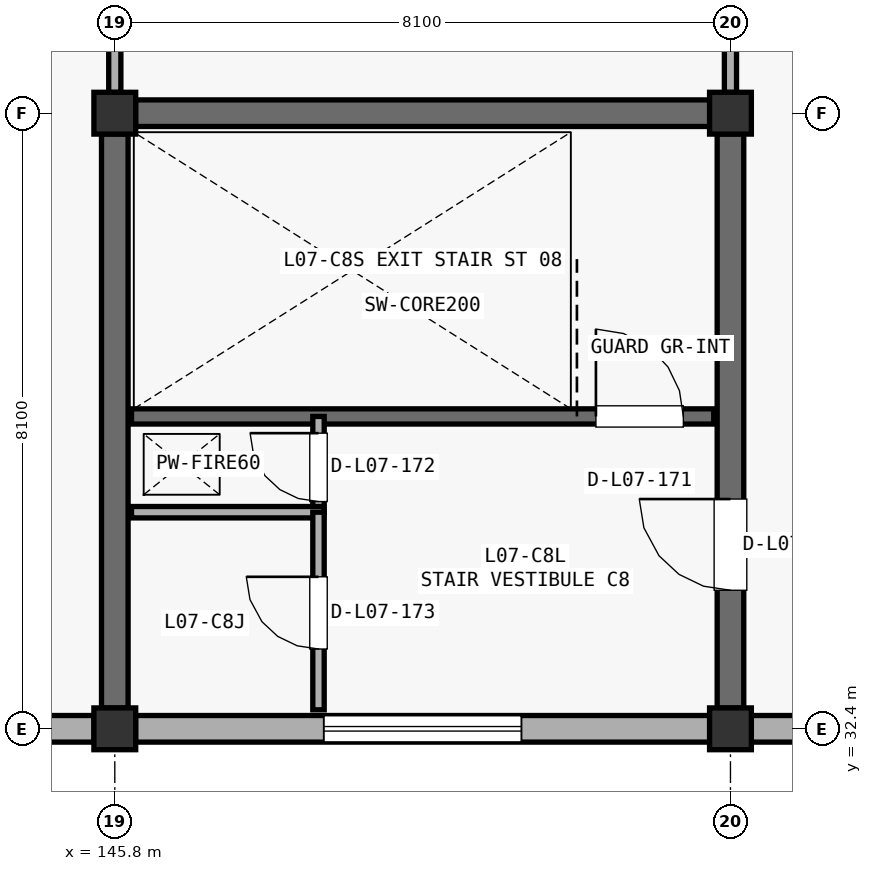
"""IFC4 building model, lengths in metres.
Left out: names, types, materials, properties, quantities, classifications, styles, units other than length and angle.
Written with IfcOpenShell. Run it as: python <this file> out.ifc"""

import sys

from ifc_helpers import new_model, si_unit, direction, frame, frame_2d, origin, origin_2d, place, context, subcontext, project, spatial, rectangle, extrude, element, fill, save


model = new_model("IFC4")
c1 = context("Model", 3, precision=1e-05, world=origin(), true_north=direction((0.0, 1.0)))
c2 = subcontext(c1, "Body", "Model", "MODEL_VIEW")
j1 = project(units=[si_unit("LENGTHUNIT", "METRE"), si_unit("PLANEANGLEUNIT", "RADIAN")], contexts=[c1])
p1 = place(None, origin())
s1 = spatial("IfcSite", under=j1, at=p1, CompositionType="ELEMENT")
p2 = place(p1, origin())
s2 = spatial("IfcBuilding", under=s1, at=p2, CompositionType="ELEMENT")
p3 = place(p2, frame((0.0, 0.0, 31.79)))
s3 = spatial("IfcBuildingStorey", under=s2, at=p3, CompositionType="ELEMENT", Elevation=31.79)
for number, where, z_axis, x_axis in (
    (1, (145.8, 32.4, 0.0), (0.0, 0.0, 1.0), (1.0, 0.0, 0.0)),
    (2, (145.8, 40.5, 0.0), (0.0, 0.0, 1.0), (1.0, 0.0, 0.0)),
    (3, (153.9, 32.4, 0.0), (0.0, 0.0, 1.0), (1.0, 0.0, 0.0)),
    (4, (153.9, 40.5, 0.0), (0.0, 0.0, 1.0), (1.0, 0.0, 0.0)),
):
    element("IfcColumn", number, at=place(p3, frame(where, z_axis=z_axis, x_axis=x_axis)), inside=s3, PredefinedType="COLUMN", context=c2, shape_type="SweptSolid", body=[
        extrude(rectangle(XDim=0.55, YDim=0.55, at=origin_2d()), origin(), (0.0, 0.0, 1.0), 4.42),
    ])
p4 = place(p3, frame((137.973, 32.4, 0.0), z_axis=(0.0, 0.0, 1.0), x_axis=(1.0, 0.0, 0.0)))
e5 = element("IfcWall", 5, at=p4, inside=s3, PredefinedType="STANDARD", context=c2, shape_type="SweptSolid", body=[
    extrude(rectangle(XDim=7.554, YDim=0.35, at=frame_2d((3.777, 0.0))), origin(), (0.0, 0.0, 1.0), 3.512),
])
p5 = place(p4, frame((2.977, 0.0, 0.85)))
e6 = element("IfcOpeningElement", 6, at=p5, cuts=e5, PredefinedType="OPENING", context=c2, shape_type="SweptSolid", body=[
    extrude(rectangle(XDim=1.6, YDim=1.85, at=frame_2d((0.8, 0.925))), frame((0.0, 0.185, 0.0), z_axis=(0.0, -1.0, 0.0), x_axis=(1.0, 0.0, 0.0)), (0.0, 0.0, 1.0), 0.37),
])
p6 = place(p3, frame((146.073, 32.4, 0.0), z_axis=(0.0, 0.0, 1.0), x_axis=(1.0, 0.0, 0.0)))
e7 = element("IfcWall", 7, at=p6, inside=s3, PredefinedType="STANDARD", context=c2, shape_type="SweptSolid", body=[
    extrude(rectangle(XDim=7.554, YDim=0.35, at=frame_2d((3.777, 0.0))), origin(), (0.0, 0.0, 1.0), 3.412),
])
p7 = place(p6, frame((2.477, 0.0, 0.85)))
e8 = element("IfcOpeningElement", 8, at=p7, cuts=e7, PredefinedType="OPENING", context=c2, shape_type="SweptSolid", body=[
    extrude(rectangle(XDim=2.6, YDim=1.95, at=frame_2d((1.3, 0.975))), frame((0.0, 0.185, 0.0), z_axis=(0.0, -1.0, 0.0), x_axis=(1.0, 0.0, 0.0)), (0.0, 0.0, 1.0), 0.37),
])
p8 = place(p3, frame((154.173, 32.4, 0.0), z_axis=(0.0, 0.0, 1.0), x_axis=(1.0, 0.0, 0.0)))
e9 = element("IfcWall", 9, at=p8, inside=s3, PredefinedType="STANDARD", context=c2, shape_type="SweptSolid", body=[
    extrude(rectangle(XDim=7.554, YDim=0.35, at=frame_2d((3.777, 0.0))), origin(), (0.0, 0.0, 1.0), 3.512),
])
p9 = place(p8, frame((2.677, 0.0, 0.85)))
e10 = element("IfcOpeningElement", 10, at=p9, cuts=e9, PredefinedType="OPENING", context=c2, shape_type="SweptSolid", body=[
    extrude(rectangle(XDim=2.2, YDim=1.95, at=frame_2d((1.1, 0.975))), frame((0.0, 0.185, 0.0), z_axis=(0.0, -1.0, 0.0), x_axis=(1.0, 0.0, 0.0)), (0.0, 0.0, 1.0), 0.37),
])
for number, where, z_axis, x_axis in (
    (11, (146.073, 40.5, 0.0), (0.0, 0.0, 1.0), (1.0, 0.0, 0.0)),
    (12, (145.8, 32.673, 0.0), (0.0, 0.0, 1.0), (0.0, 1.0, 0.0)),
):
    element("IfcWall", number, at=place(p3, frame(where, z_axis=z_axis, x_axis=x_axis)), inside=s3, PredefinedType="SHEAR", context=c2, shape_type="SweptSolid", body=[
        extrude(rectangle(XDim=7.554, YDim=0.35, at=frame_2d((3.777, 0.0))), origin(), (0.0, 0.0, 1.0), 4.162),
    ])
p10 = place(p3, frame((153.9, 32.673, 0.0), z_axis=(0.0, 0.0, 1.0), x_axis=(0.0, 1.0, 0.0)))
e13 = element("IfcWall", 13, at=p10, inside=s3, PredefinedType="SHEAR", context=c2, shape_type="SweptSolid", body=[
    extrude(rectangle(XDim=7.554, YDim=0.35, at=frame_2d((3.777, 0.0))), origin(), (0.0, 0.0, 1.0), 4.162),
])
p11 = place(p10, frame((1.55, 0.0, 0.0)))
e14 = element("IfcOpeningElement", 14, at=p11, cuts=e13, PredefinedType="OPENING", context=c2, shape_type="SweptSolid", body=[
    extrude(rectangle(XDim=1.2, YDim=2.2, at=frame_2d((0.6, 1.1))), frame((0.0, 0.185, 0.0), z_axis=(0.0, -1.0, 0.0), x_axis=(1.0, 0.0, 0.0)), (0.0, 0.0, 1.0), 0.37),
])
p12 = place(p3, frame((146.02, 36.51, 0.0), z_axis=(0.0, 0.0, 1.0), x_axis=(1.0, 0.0, 0.0)))
e15 = element("IfcWall", 15, at=p12, inside=s3, PredefinedType="SHEAR", context=c2, shape_type="SweptSolid", body=[
    extrude(rectangle(XDim=7.66, YDim=0.2, at=frame_2d((3.83, 0.0))), origin(), (0.0, 0.0, 1.0), 4.162),
])
p13 = place(p12, frame((6.11, 0.0, 0.0)))
e16 = element("IfcOpeningElement", 16, at=p13, cuts=e15, PredefinedType="OPENING", context=c2, shape_type="SweptSolid", body=[
    extrude(rectangle(XDim=1.15, YDim=2.2, at=frame_2d((0.575, 1.1))), frame((0.0, 0.11, 0.0), z_axis=(0.0, -1.0, 0.0), x_axis=(1.0, 0.0, 0.0)), (0.0, 0.0, 1.0), 0.22),
])
p14 = place(p3, frame((148.48, 35.25, 0.0), z_axis=(0.0, 0.0, 1.0), x_axis=(0.0, 1.0, 0.0)))
e17 = element("IfcWall", 17, at=p14, inside=s3, PredefinedType="PARTITIONING", context=c2, shape_type="SweptSolid", body=[
    extrude(rectangle(XDim=1.26, YDim=0.15, at=frame_2d((0.63, 0.0))), origin(), (0.0, 0.0, 1.0), 4.162),
])
p15 = place(p14, frame((0.14, 0.0, 0.0)))
e18 = element("IfcOpeningElement", 18, at=p15, cuts=e17, PredefinedType="OPENING", context=c2, shape_type="SweptSolid", body=[
    extrude(rectangle(XDim=0.9, YDim=2.15, at=frame_2d((0.45, 1.075))), frame((0.0, 0.085, 0.0), z_axis=(0.0, -1.0, 0.0), x_axis=(1.0, 0.0, 0.0)), (0.0, 0.0, 1.0), 0.17),
])
p16 = place(p3, frame((146.02, 35.25, 0.0), z_axis=(0.0, 0.0, 1.0), x_axis=(1.0, 0.0, 0.0)))
e19 = element("IfcWall", 19, at=p16, inside=s3, PredefinedType="PARTITIONING", context=c2, shape_type="SweptSolid", body=[
    extrude(rectangle(XDim=2.53, YDim=0.15, at=frame_2d((1.265, 0.0))), origin(), (0.0, 0.0, 1.0), 4.162),
])
p17 = place(p3, frame((148.48, 32.65, 0.0), z_axis=(0.0, 0.0, 1.0), x_axis=(0.0, 1.0, 0.0)))
e20 = element("IfcWall", 20, at=p17, inside=s3, PredefinedType="PARTITIONING", context=c2, shape_type="SweptSolid", body=[
    extrude(rectangle(XDim=2.6, YDim=0.15, at=frame_2d((1.3, 0.0))), origin(), (0.0, 0.0, 1.0), 4.162),
])
p18 = place(p17, frame((0.8, 0.0, 0.0)))
e21 = element("IfcOpeningElement", 21, at=p18, cuts=e20, PredefinedType="OPENING", context=c2, shape_type="SweptSolid", body=[
    extrude(rectangle(XDim=0.95, YDim=2.15, at=frame_2d((0.475, 1.075))), frame((0.0, 0.085, 0.0), z_axis=(0.0, -1.0, 0.0), x_axis=(1.0, 0.0, 0.0)), (0.0, 0.0, 1.0), 0.17),
])
p19 = place(p3, frame((145.8, 40.773, 0.0), z_axis=(0.0, 0.0, 1.0), x_axis=(0.0, 1.0, 0.0)))
e22 = element("IfcWall", 22, at=p19, inside=s3, PredefinedType="PARTITIONING", context=c2, shape_type="SweptSolid", body=[
    extrude(rectangle(XDim=7.554, YDim=0.16, at=frame_2d((3.777, 0.0))), origin(), (0.0, 0.0, 1.0), 3.212),
])
p20 = place(p19, frame((2.917, 0.0, 0.0)))
e23 = element("IfcOpeningElement", 23, at=p20, cuts=e22, PredefinedType="OPENING", context=c2, shape_type="SweptSolid", body=[
    extrude(rectangle(XDim=1.72, YDim=2.3, at=frame_2d((0.86, 1.15))), frame((0.0, 0.09, 0.0), z_axis=(0.0, -1.0, 0.0), x_axis=(1.0, 0.0, 0.0)), (0.0, 0.0, 1.0), 0.18),
])
p21 = place(p3, frame((153.9, 40.773, 0.0), z_axis=(0.0, 0.0, 1.0), x_axis=(0.0, 1.0, 0.0)))
e24 = element("IfcWall", 24, at=p21, inside=s3, PredefinedType="PARTITIONING", context=c2, shape_type="SweptSolid", body=[
    extrude(rectangle(XDim=7.554, YDim=0.16, at=frame_2d((3.777, 0.0))), origin(), (0.0, 0.0, 1.0), 3.512),
])
p22 = place(p21, frame((3.177, 0.0, 0.0)))
e25 = element("IfcOpeningElement", 25, at=p22, cuts=e24, PredefinedType="OPENING", context=c2, shape_type="SweptSolid", body=[
    extrude(rectangle(XDim=1.2, YDim=2.2, at=frame_2d((0.6, 1.1))), frame((0.0, 0.09, 0.0), z_axis=(0.0, -1.0, 0.0), x_axis=(1.0, 0.0, 0.0)), (0.0, 0.0, 1.0), 0.18),
])
p23 = place(p7, origin())
e26 = element("IfcWindow", 26, at=p23, inside=s3, PartitioningType="SINGLE_PANEL", PredefinedType="WINDOW", context=c2, shape_type="SweptSolid", body=[
    extrude(rectangle(XDim=2.6, YDim=1.95, at=frame_2d((1.3, 0.975))), frame((0.0, 0.03, 0.0), z_axis=(0.0, -1.0, 0.0), x_axis=(1.0, 0.0, 0.0)), (0.0, 0.0, 1.0), 0.06),
])
fill(e8, e26)
p24 = place(p11, origin())
e27 = element("IfcDoor", 27, at=p24, inside=s3, OperationType="SINGLE_SWING_RIGHT", PredefinedType="DOOR", context=c2, shape_type="SweptSolid", body=[
    extrude(rectangle(XDim=1.2, YDim=2.2, at=frame_2d((0.6, 1.1))), frame((0.0, 0.025, 0.0), z_axis=(0.0, -1.0, 0.0), x_axis=(1.0, 0.0, 0.0)), (0.0, 0.0, 1.0), 0.05),
])
fill(e14, e27)
p25 = place(p13, origin())
e28 = element("IfcDoor", 28, at=p25, inside=s3, OperationType="SINGLE_SWING_LEFT", PredefinedType="DOOR", context=c2, shape_type="SweptSolid", body=[
    extrude(rectangle(XDim=1.15, YDim=2.2, at=frame_2d((0.575, 1.1))), frame((0.0, 0.025, 0.0), z_axis=(0.0, -1.0, 0.0), x_axis=(1.0, 0.0, 0.0)), (0.0, 0.0, 1.0), 0.05),
])
fill(e16, e28)
p26 = place(p15, origin())
e29 = element("IfcDoor", 29, at=p26, inside=s3, OperationType="SINGLE_SWING_RIGHT", PredefinedType="DOOR", context=c2, shape_type="SweptSolid", body=[
    extrude(rectangle(XDim=0.9, YDim=2.15, at=frame_2d((0.45, 1.075))), frame((0.0, 0.025, 0.0), z_axis=(0.0, -1.0, 0.0), x_axis=(1.0, 0.0, 0.0)), (0.0, 0.0, 1.0), 0.05),
])
fill(e18, e29)
p27 = place(p18, origin())
e30 = element("IfcDoor", 30, at=p27, inside=s3, OperationType="SINGLE_SWING_RIGHT", PredefinedType="DOOR", context=c2, shape_type="SweptSolid", body=[
    extrude(rectangle(XDim=0.95, YDim=2.15, at=frame_2d((0.475, 1.075))), frame((0.0, 0.025, 0.0), z_axis=(0.0, -1.0, 0.0), x_axis=(1.0, 0.0, 0.0)), (0.0, 0.0, 1.0), 0.05),
])
fill(e21, e30)
save(model, sys.argv[1])
